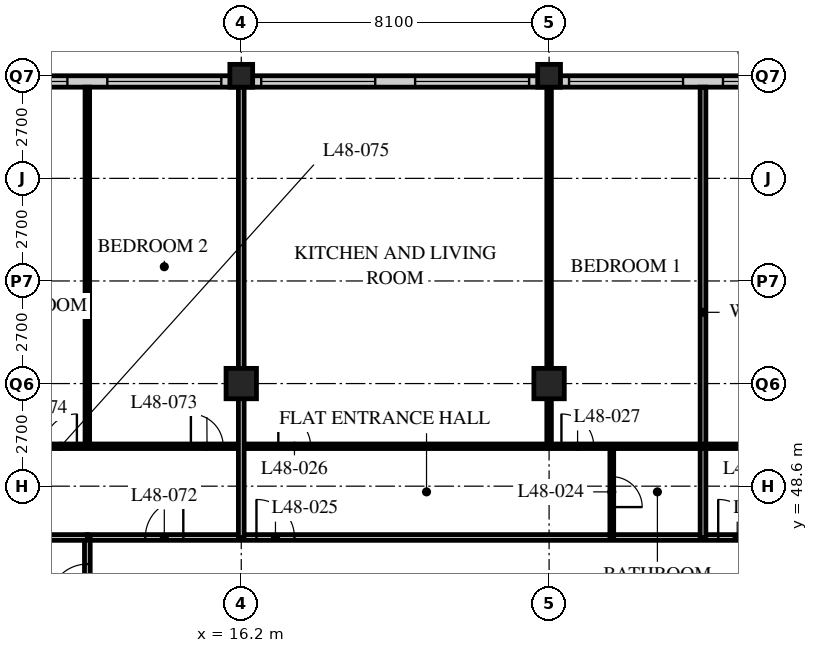
"""IFC4 building model, lengths in metres.
Left out: names, types, materials, properties, quantities, classifications, styles, units other than length and angle.
Written with IfcOpenShell. Run it as: python <this file> out.ifc"""

import sys

from ifc_helpers import new_model, si_unit, direction, frame, frame_2d, origin, origin_2d, place, context, subcontext, project, spatial, rectangle, hollow_rectangle, extrude, element, fill, save


model = new_model("IFC4")
c1 = context("Model", 3, precision=1e-05, world=origin(), true_north=direction((0.0, 1.0)))
c2 = subcontext(c1, "Body", "Model", "MODEL_VIEW")
j1 = project(units=[si_unit("LENGTHUNIT", "METRE"), si_unit("PLANEANGLEUNIT", "RADIAN")], contexts=[c1])
p1 = place(None, origin())
s1 = spatial("IfcSite", under=j1, at=p1, CompositionType="ELEMENT")
p2 = place(p1, origin())
s2 = spatial("IfcBuilding", under=s1, at=p2, CompositionType="ELEMENT")
p3 = place(p2, frame((0.0, 0.0, 188.4)))
s3 = spatial("IfcBuildingStorey", under=s2, at=p3, CompositionType="ELEMENT", Elevation=188.4)
p4 = place(p3, frame((16.2, 51.3, 0.0), z_axis=(0.0, 0.0, 1.0), x_axis=(1.0, 0.0, 0.0)))
e1 = element("IfcColumn", 1, at=p4, inside=s3, PredefinedType="COLUMN", context=c2, shape_type="SweptSolid", body=[
    extrude(hollow_rectangle(XDim=0.8, YDim=0.8, WallThickness=0.08, at=origin_2d()), origin(), (0.0, 0.0, 1.0), 3.6),
])
p5 = place(p3, frame((16.2, 59.4, 0.0), z_axis=(0.0, 0.0, 1.0), x_axis=(1.0, 0.0, 0.0)))
e2 = element("IfcColumn", 2, at=p5, inside=s3, PredefinedType="COLUMN", context=c2, shape_type="SweptSolid", body=[
    extrude(hollow_rectangle(XDim=0.6, YDim=0.6, WallThickness=0.05, at=origin_2d()), origin(), (0.0, 0.0, 1.0), 3.6),
])
p6 = place(p3, frame((24.3, 51.3, 0.0), z_axis=(0.0, 0.0, 1.0), x_axis=(1.0, 0.0, 0.0)))
e3 = element("IfcColumn", 3, at=p6, inside=s3, PredefinedType="COLUMN", context=c2, shape_type="SweptSolid", body=[
    extrude(hollow_rectangle(XDim=0.8, YDim=0.8, WallThickness=0.08, at=origin_2d()), origin(), (0.0, 0.0, 1.0), 3.6),
])
p7 = place(p3, frame((24.3, 59.4, 0.0), z_axis=(0.0, 0.0, 1.0), x_axis=(1.0, 0.0, 0.0)))
e4 = element("IfcColumn", 4, at=p7, inside=s3, PredefinedType="COLUMN", context=c2, shape_type="SweptSolid", body=[
    extrude(hollow_rectangle(XDim=0.6, YDim=0.6, WallThickness=0.05, at=origin_2d()), origin(), (0.0, 0.0, 1.0), 3.6),
])
p8 = place(p3, frame((48.3, 59.25, 0.0), z_axis=(0.0, 0.0, 1.0), x_axis=(-1.0, 0.0, 0.0)))
e5 = element("IfcWall", 5, at=p8, inside=s3, PredefinedType="SOLIDWALL", context=c2, shape_type="SweptSolid", body=[
    extrude(rectangle(XDim=40.2, YDim=0.3, at=frame_2d((20.1, 0.0))), origin(), (0.0, 0.0, 1.0), 3.39),
])
p9 = place(p8, frame((0.225, 0.0, 0.6)))
e6 = element("IfcOpeningElement", 6, at=p9, cuts=e5, PredefinedType="OPENING", context=c2, shape_type="SweptSolid", body=[
    extrude(rectangle(XDim=3.0, YDim=2.4, at=frame_2d((1.5, 1.2))), frame((0.0, 0.16, 0.0), z_axis=(0.0, -1.0, 0.0), x_axis=(1.0, 0.0, 0.0)), (0.0, 0.0, 1.0), 0.32),
])
p10 = place(p8, frame((4.275, 0.0, 0.6)))
e7 = element("IfcOpeningElement", 7, at=p10, cuts=e5, PredefinedType="OPENING", context=c2, shape_type="SweptSolid", body=[
    extrude(rectangle(XDim=3.0, YDim=2.4, at=frame_2d((1.5, 1.2))), frame((0.0, 0.16, 0.0), z_axis=(0.0, -1.0, 0.0), x_axis=(1.0, 0.0, 0.0)), (0.0, 0.0, 1.0), 0.32),
])
p11 = place(p8, frame((8.325, 0.0, 0.6)))
e8 = element("IfcOpeningElement", 8, at=p11, cuts=e5, PredefinedType="OPENING", context=c2, shape_type="SweptSolid", body=[
    extrude(rectangle(XDim=3.0, YDim=2.4, at=frame_2d((1.5, 1.2))), frame((0.0, 0.16, 0.0), z_axis=(0.0, -1.0, 0.0), x_axis=(1.0, 0.0, 0.0)), (0.0, 0.0, 1.0), 0.32),
])
p12 = place(p8, frame((12.375, 0.0, 0.6)))
e9 = element("IfcOpeningElement", 9, at=p12, cuts=e5, PredefinedType="OPENING", context=c2, shape_type="SweptSolid", body=[
    extrude(rectangle(XDim=3.0, YDim=2.4, at=frame_2d((1.5, 1.2))), frame((0.0, 0.16, 0.0), z_axis=(0.0, -1.0, 0.0), x_axis=(1.0, 0.0, 0.0)), (0.0, 0.0, 1.0), 0.32),
])
p13 = place(p8, frame((16.425, 0.0, 0.6)))
e10 = element("IfcOpeningElement", 10, at=p13, cuts=e5, PredefinedType="OPENING", context=c2, shape_type="SweptSolid", body=[
    extrude(rectangle(XDim=3.0, YDim=2.4, at=frame_2d((1.5, 1.2))), frame((0.0, 0.16, 0.0), z_axis=(0.0, -1.0, 0.0), x_axis=(1.0, 0.0, 0.0)), (0.0, 0.0, 1.0), 0.32),
])
p14 = place(p8, frame((20.475, 0.0, 0.6)))
e11 = element("IfcOpeningElement", 11, at=p14, cuts=e5, PredefinedType="OPENING", context=c2, shape_type="SweptSolid", body=[
    extrude(rectangle(XDim=3.0, YDim=2.4, at=frame_2d((1.5, 1.2))), frame((0.0, 0.16, 0.0), z_axis=(0.0, -1.0, 0.0), x_axis=(1.0, 0.0, 0.0)), (0.0, 0.0, 1.0), 0.32),
])
p15 = place(p8, frame((24.525, 0.0, 0.6)))
e12 = element("IfcOpeningElement", 12, at=p15, cuts=e5, PredefinedType="OPENING", context=c2, shape_type="SweptSolid", body=[
    extrude(rectangle(XDim=3.0, YDim=2.4, at=frame_2d((1.5, 1.2))), frame((0.0, 0.16, 0.0), z_axis=(0.0, -1.0, 0.0), x_axis=(1.0, 0.0, 0.0)), (0.0, 0.0, 1.0), 0.32),
])
p16 = place(p8, frame((28.575, 0.0, 0.6)))
e13 = element("IfcOpeningElement", 13, at=p16, cuts=e5, PredefinedType="OPENING", context=c2, shape_type="SweptSolid", body=[
    extrude(rectangle(XDim=3.0, YDim=2.4, at=frame_2d((1.5, 1.2))), frame((0.0, 0.16, 0.0), z_axis=(0.0, -1.0, 0.0), x_axis=(1.0, 0.0, 0.0)), (0.0, 0.0, 1.0), 0.32),
])
p17 = place(p8, frame((32.625, 0.0, 0.6)))
e14 = element("IfcOpeningElement", 14, at=p17, cuts=e5, PredefinedType="OPENING", context=c2, shape_type="SweptSolid", body=[
    extrude(rectangle(XDim=3.0, YDim=2.4, at=frame_2d((1.5, 1.2))), frame((0.0, 0.16, 0.0), z_axis=(0.0, -1.0, 0.0), x_axis=(1.0, 0.0, 0.0)), (0.0, 0.0, 1.0), 0.32),
])
p18 = place(p8, frame((36.675, 0.0, 0.6)))
e15 = element("IfcOpeningElement", 15, at=p18, cuts=e5, PredefinedType="OPENING", context=c2, shape_type="SweptSolid", body=[
    extrude(rectangle(XDim=3.0, YDim=2.4, at=frame_2d((1.5, 1.2))), frame((0.0, 0.16, 0.0), z_axis=(0.0, -1.0, 0.0), x_axis=(1.0, 0.0, 0.0)), (0.0, 0.0, 1.0), 0.32),
])
p19 = place(p3, frame((12.15, 47.25, 0.0), z_axis=(0.0, 0.0, 1.0), x_axis=(1.0, 0.0, 0.0)))
e16 = element("IfcWall", 16, at=p19, inside=s3, PredefinedType="PARTITIONING", context=c2, shape_type="SweptSolid", body=[
    extrude(rectangle(XDim=32.4, YDim=0.15, at=frame_2d((16.2, 0.0))), origin(), (0.0, 0.0, 1.0), 3.39),
])
p20 = place(p19, frame((4.45, 0.0, 0.0)))
e17 = element("IfcOpeningElement", 17, at=p20, cuts=e16, PredefinedType="OPENING", context=c2, shape_type="SweptSolid", body=[
    extrude(rectangle(XDim=1.0, YDim=2.1, at=frame_2d((0.5, 1.05))), frame((0.0, 0.085, 0.0), z_axis=(0.0, -1.0, 0.0), x_axis=(1.0, 0.0, 0.0)), (0.0, 0.0, 1.0), 0.17),
])
p21 = place(p19, frame((16.6, 0.0, 0.0)))
e18 = element("IfcOpeningElement", 18, at=p21, cuts=e16, PredefinedType="OPENING", context=c2, shape_type="SweptSolid", body=[
    extrude(rectangle(XDim=1.0, YDim=2.1, at=frame_2d((0.5, 1.05))), frame((0.0, 0.085, 0.0), z_axis=(0.0, -1.0, 0.0), x_axis=(1.0, 0.0, 0.0)), (0.0, 0.0, 1.0), 0.17),
])
p22 = place(p19, frame((29.875, 0.0, 0.0)))
e19 = element("IfcOpeningElement", 19, at=p22, cuts=e16, PredefinedType="OPENING", context=c2, shape_type="SweptSolid", body=[
    extrude(rectangle(XDim=1.0, YDim=2.1, at=frame_2d((0.5, 1.05))), frame((0.0, 0.085, 0.0), z_axis=(0.0, -1.0, 0.0), x_axis=(1.0, 0.0, 0.0)), (0.0, 0.0, 1.0), 0.17),
])
p23 = place(p19, frame((1.525, 0.0, 0.0)))
e20 = element("IfcOpeningElement", 20, at=p23, cuts=e16, PredefinedType="OPENING", context=c2, shape_type="SweptSolid", body=[
    extrude(rectangle(XDim=1.0, YDim=2.1, at=frame_2d((0.5, 1.05))), frame((0.0, 0.085, 0.0), z_axis=(0.0, -1.0, 0.0), x_axis=(1.0, 0.0, 0.0)), (0.0, 0.0, 1.0), 0.17),
])
p24 = place(p3, frame((12.15, 18.9, 0.0), z_axis=(0.0, 0.0, 1.0), x_axis=(0.0, 1.0, 0.0)))
e21 = element("IfcWall", 21, at=p24, inside=s3, PredefinedType="PARTITIONING", context=c2, shape_type="SweptSolid", body=[
    extrude(rectangle(XDim=28.35, YDim=0.15, at=frame_2d((14.175, 0.0))), origin(), (0.0, 0.0, 1.0), 3.39),
])
p25 = place(p24, frame((2.35, 0.0, 0.0)))
e22 = element("IfcOpeningElement", 22, at=p25, cuts=e21, PredefinedType="OPENING", context=c2, shape_type="SweptSolid", body=[
    extrude(rectangle(XDim=1.0, YDim=2.1, at=frame_2d((0.5, 1.05))), frame((0.0, 0.085, 0.0), z_axis=(0.0, -1.0, 0.0), x_axis=(1.0, 0.0, 0.0)), (0.0, 0.0, 1.0), 0.17),
])
p26 = place(p24, frame((6.4, 0.0, 0.0)))
e23 = element("IfcOpeningElement", 23, at=p26, cuts=e21, PredefinedType="OPENING", context=c2, shape_type="SweptSolid", body=[
    extrude(rectangle(XDim=1.0, YDim=2.1, at=frame_2d((0.5, 1.05))), frame((0.0, 0.085, 0.0), z_axis=(0.0, -1.0, 0.0), x_axis=(1.0, 0.0, 0.0)), (0.0, 0.0, 1.0), 0.17),
])
p27 = place(p24, frame((8.5, 0.0, 0.0)))
e24 = element("IfcOpeningElement", 24, at=p27, cuts=e21, PredefinedType="OPENING", context=c2, shape_type="SweptSolid", body=[
    extrude(rectangle(XDim=1.0, YDim=2.1, at=frame_2d((0.5, 1.05))), frame((0.0, 0.085, 0.0), z_axis=(0.0, -1.0, 0.0), x_axis=(1.0, 0.0, 0.0)), (0.0, 0.0, 1.0), 0.17),
])
p28 = place(p24, frame((16.6, 0.0, 0.0)))
e25 = element("IfcOpeningElement", 25, at=p28, cuts=e21, PredefinedType="OPENING", context=c2, shape_type="SweptSolid", body=[
    extrude(rectangle(XDim=1.0, YDim=2.1, at=frame_2d((0.5, 1.05))), frame((0.0, 0.085, 0.0), z_axis=(0.0, -1.0, 0.0), x_axis=(1.0, 0.0, 0.0)), (0.0, 0.0, 1.0), 0.17),
])
p29 = place(p24, frame((26.65, 0.0, 0.0)))
e26 = element("IfcOpeningElement", 26, at=p29, cuts=e21, PredefinedType="OPENING", context=c2, shape_type="SweptSolid", body=[
    extrude(rectangle(XDim=1.0, YDim=2.1, at=frame_2d((0.5, 1.05))), frame((0.0, 0.085, 0.0), z_axis=(0.0, -1.0, 0.0), x_axis=(1.0, 0.0, 0.0)), (0.0, 0.0, 1.0), 0.17),
])
p30 = place(p3, frame((25.95, 47.25, 0.0), z_axis=(0.0, 0.0, 1.0), x_axis=(0.0, 1.0, 0.0)))
e27 = element("IfcWall", 27, at=p30, inside=s3, PredefinedType="PARTITIONING", context=c2, shape_type="SweptSolid", body=[
    extrude(rectangle(XDim=2.4, YDim=0.1, at=frame_2d((1.2, 0.0))), origin(), (0.0, 0.0, 1.0), 3.39),
])
p31 = place(p30, frame((0.8, 0.0, 0.0)))
e28 = element("IfcOpeningElement", 28, at=p31, cuts=e27, PredefinedType="OPENING", context=c2, shape_type="SweptSolid", body=[
    extrude(rectangle(XDim=0.8, YDim=2.1, at=frame_2d((0.4, 1.05))), frame((0.0, 0.06, 0.0), z_axis=(0.0, -1.0, 0.0), x_axis=(1.0, 0.0, 0.0)), (0.0, 0.0, 1.0), 0.12),
])
p32 = place(p3, frame((24.3, 49.65, 0.0), z_axis=(0.0, 0.0, 1.0), x_axis=(0.0, 1.0, 0.0)))
e29 = element("IfcWall", 29, at=p32, inside=s3, PredefinedType="PARTITIONING", context=c2, shape_type="SweptSolid", body=[
    extrude(rectangle(XDim=9.45, YDim=0.12, at=frame_2d((4.725, 0.0))), origin(), (0.0, 0.0, 1.0), 2.778),
])
p33 = place(p3, frame((28.35, 47.25, 0.0), z_axis=(0.0, 0.0, 1.0), x_axis=(0.0, 1.0, 0.0)))
e30 = element("IfcWall", 30, at=p33, inside=s3, PredefinedType="PARTITIONING", context=c2, shape_type="SweptSolid", body=[
    extrude(rectangle(XDim=11.85, YDim=0.15, at=frame_2d((5.925, 0.0))), origin(), (0.0, 0.0, 1.0), 3.39),
])
p34 = place(p3, frame((8.15, 49.65, 0.0), z_axis=(0.0, 0.0, 1.0), x_axis=(1.0, 0.0, 0.0)))
e31 = element("IfcWall", 31, at=p34, inside=s3, PredefinedType="PARTITIONING", context=c2, shape_type="SweptSolid", body=[
    extrude(rectangle(XDim=40.4, YDim=0.12, at=frame_2d((20.2, 0.0))), origin(), (0.0, 0.0, 1.0), 3.39),
])
p35 = place(p34, frame((9.025, 0.0, 0.0)))
e32 = element("IfcOpeningElement", 32, at=p35, cuts=e31, PredefinedType="OPENING", context=c2, shape_type="SweptSolid", body=[
    extrude(rectangle(XDim=0.85, YDim=2.1, at=frame_2d((0.425, 1.05))), frame((0.0, 0.07, 0.0), z_axis=(0.0, -1.0, 0.0), x_axis=(1.0, 0.0, 0.0)), (0.0, 0.0, 1.0), 0.14),
])
p36 = place(p34, frame((16.475, 0.0, 0.0)))
e33 = element("IfcOpeningElement", 33, at=p36, cuts=e31, PredefinedType="OPENING", context=c2, shape_type="SweptSolid", body=[
    extrude(rectangle(XDim=0.85, YDim=2.1, at=frame_2d((0.425, 1.05))), frame((0.0, 0.07, 0.0), z_axis=(0.0, -1.0, 0.0), x_axis=(1.0, 0.0, 0.0)), (0.0, 0.0, 1.0), 0.14),
])
p37 = place(p34, frame((21.175, 0.0, 0.0)))
e34 = element("IfcOpeningElement", 34, at=p37, cuts=e31, PredefinedType="OPENING", context=c2, shape_type="SweptSolid", body=[
    extrude(rectangle(XDim=0.85, YDim=2.1, at=frame_2d((0.425, 1.05))), frame((0.0, 0.07, 0.0), z_axis=(0.0, -1.0, 0.0), x_axis=(1.0, 0.0, 0.0)), (0.0, 0.0, 1.0), 0.14),
])
p38 = place(p34, frame((28.625, 0.0, 0.0)))
e35 = element("IfcOpeningElement", 35, at=p38, cuts=e31, PredefinedType="OPENING", context=c2, shape_type="SweptSolid", body=[
    extrude(rectangle(XDim=0.85, YDim=2.1, at=frame_2d((0.425, 1.05))), frame((0.0, 0.07, 0.0), z_axis=(0.0, -1.0, 0.0), x_axis=(1.0, 0.0, 0.0)), (0.0, 0.0, 1.0), 0.14),
])
p39 = place(p34, frame((32.825, 0.0, 0.0)))
e36 = element("IfcOpeningElement", 36, at=p39, cuts=e31, PredefinedType="OPENING", context=c2, shape_type="SweptSolid", body=[
    extrude(rectangle(XDim=0.85, YDim=2.1, at=frame_2d((0.425, 1.05))), frame((0.0, 0.07, 0.0), z_axis=(0.0, -1.0, 0.0), x_axis=(1.0, 0.0, 0.0)), (0.0, 0.0, 1.0), 0.14),
])
p40 = place(p34, frame((36.675, 0.0, 0.0)))
e37 = element("IfcOpeningElement", 37, at=p40, cuts=e31, PredefinedType="OPENING", context=c2, shape_type="SweptSolid", body=[
    extrude(rectangle(XDim=0.85, YDim=2.1, at=frame_2d((0.425, 1.05))), frame((0.0, 0.07, 0.0), z_axis=(0.0, -1.0, 0.0), x_axis=(1.0, 0.0, 0.0)), (0.0, 0.0, 1.0), 0.14),
])
p41 = place(p34, frame((6.725, 0.0, 0.0)))
e38 = element("IfcOpeningElement", 38, at=p41, cuts=e31, PredefinedType="OPENING", context=c2, shape_type="SweptSolid", body=[
    extrude(rectangle(XDim=0.85, YDim=2.1, at=frame_2d((0.425, 1.05))), frame((0.0, 0.07, 0.0), z_axis=(0.0, -1.0, 0.0), x_axis=(1.0, 0.0, 0.0)), (0.0, 0.0, 1.0), 0.14),
])
p42 = place(p34, frame((2.875, 0.0, 0.0)))
e39 = element("IfcOpeningElement", 39, at=p42, cuts=e31, PredefinedType="OPENING", context=c2, shape_type="SweptSolid", body=[
    extrude(rectangle(XDim=0.85, YDim=2.1, at=frame_2d((0.425, 1.05))), frame((0.0, 0.07, 0.0), z_axis=(0.0, -1.0, 0.0), x_axis=(1.0, 0.0, 0.0)), (0.0, 0.0, 1.0), 0.14),
])
p43 = place(p3, frame((12.15, 49.65, 0.0), z_axis=(0.0, 0.0, 1.0), x_axis=(0.0, 1.0, 0.0)))
e40 = element("IfcWall", 40, at=p43, inside=s3, PredefinedType="PARTITIONING", context=c2, shape_type="SweptSolid", body=[
    extrude(rectangle(XDim=9.45, YDim=0.12, at=frame_2d((4.725, 0.0))), origin(), (0.0, 0.0, 1.0), 3.39),
])
p44 = place(p3, frame((0.3, 47.25, 0.0), z_axis=(0.0, 0.0, 1.0), x_axis=(1.0, 0.0, 0.0)))
e41 = element("IfcWall", 41, at=p44, inside=s3, PredefinedType="PARTITIONING", context=c2, shape_type="SweptSolid", body=[
    extrude(rectangle(XDim=11.85, YDim=0.15, at=frame_2d((5.925, 0.0))), origin(), (0.0, 0.0, 1.0), 3.39),
])
p45 = place(p3, frame((16.2, 47.25, 0.0), z_axis=(0.0, 0.0, 1.0), x_axis=(0.0, 1.0, 0.0)))
e42 = element("IfcWall", 42, at=p45, inside=s3, PredefinedType="PARTITIONING", context=c2, shape_type="SweptSolid", body=[
    extrude(rectangle(XDim=11.85, YDim=0.15, at=frame_2d((5.925, 0.0))), origin(), (0.0, 0.0, 1.0), 2.778),
])
p46 = place(p13, origin())
e43 = element("IfcWindow", 43, at=p46, inside=s3, PartitioningType="SINGLE_PANEL", PredefinedType="WINDOW", context=c2, shape_type="SweptSolid", body=[
    extrude(rectangle(XDim=3.0, YDim=2.4, at=frame_2d((1.5, 1.2))), frame((0.0, 0.03, 0.0), z_axis=(0.0, -1.0, 0.0), x_axis=(1.0, 0.0, 0.0)), (0.0, 0.0, 1.0), 0.06),
])
fill(e10, e43)
p47 = place(p14, origin())
e44 = element("IfcWindow", 44, at=p47, inside=s3, PartitioningType="SINGLE_PANEL", PredefinedType="WINDOW", context=c2, shape_type="SweptSolid", body=[
    extrude(rectangle(XDim=3.0, YDim=2.4, at=frame_2d((1.5, 1.2))), frame((0.0, 0.03, 0.0), z_axis=(0.0, -1.0, 0.0), x_axis=(1.0, 0.0, 0.0)), (0.0, 0.0, 1.0), 0.06),
])
fill(e11, e44)
p48 = place(p15, origin())
e45 = element("IfcWindow", 45, at=p48, inside=s3, PartitioningType="SINGLE_PANEL", PredefinedType="WINDOW", context=c2, shape_type="SweptSolid", body=[
    extrude(rectangle(XDim=3.0, YDim=2.4, at=frame_2d((1.5, 1.2))), frame((0.0, 0.03, 0.0), z_axis=(0.0, -1.0, 0.0), x_axis=(1.0, 0.0, 0.0)), (0.0, 0.0, 1.0), 0.06),
])
fill(e12, e45)
p49 = place(p16, origin())
e46 = element("IfcWindow", 46, at=p49, inside=s3, PartitioningType="SINGLE_PANEL", PredefinedType="WINDOW", context=c2, shape_type="SweptSolid", body=[
    extrude(rectangle(XDim=3.0, YDim=2.4, at=frame_2d((1.5, 1.2))), frame((0.0, 0.03, 0.0), z_axis=(0.0, -1.0, 0.0), x_axis=(1.0, 0.0, 0.0)), (0.0, 0.0, 1.0), 0.06),
])
fill(e13, e46)
p50 = place(p17, origin())
e47 = element("IfcWindow", 47, at=p50, inside=s3, PartitioningType="SINGLE_PANEL", PredefinedType="WINDOW", context=c2, shape_type="SweptSolid", body=[
    extrude(rectangle(XDim=3.0, YDim=2.4, at=frame_2d((1.5, 1.2))), frame((0.0, 0.03, 0.0), z_axis=(0.0, -1.0, 0.0), x_axis=(1.0, 0.0, 0.0)), (0.0, 0.0, 1.0), 0.06),
])
fill(e14, e47)
p51 = place(p18, origin())
e48 = element("IfcWindow", 48, at=p51, inside=s3, PartitioningType="SINGLE_PANEL", PredefinedType="WINDOW", context=c2, shape_type="SweptSolid", body=[
    extrude(rectangle(XDim=3.0, YDim=2.4, at=frame_2d((1.5, 1.2))), frame((0.0, 0.03, 0.0), z_axis=(0.0, -1.0, 0.0), x_axis=(1.0, 0.0, 0.0)), (0.0, 0.0, 1.0), 0.06),
])
fill(e15, e48)
p52 = place(p31, origin())
e49 = element("IfcDoor", 49, at=p52, inside=s3, OperationType="SINGLE_SWING_RIGHT", PredefinedType="DOOR", context=c2, shape_type="SweptSolid", body=[
    extrude(rectangle(XDim=0.8, YDim=2.1, at=frame_2d((0.4, 1.05))), frame((0.0, 0.025, 0.0), z_axis=(0.0, -1.0, 0.0), x_axis=(1.0, 0.0, 0.0)), (0.0, 0.0, 1.0), 0.05),
])
fill(e28, e49)
p53 = place(p20, origin())
e50 = element("IfcDoor", 50, at=p53, inside=s3, OperationType="SINGLE_SWING_LEFT", PredefinedType="DOOR", context=c2, shape_type="SweptSolid", body=[
    extrude(rectangle(XDim=1.0, YDim=2.1, at=frame_2d((0.5, 1.05))), frame((0.0, 0.025, 0.0), z_axis=(0.0, -1.0, 0.0), x_axis=(1.0, 0.0, 0.0)), (0.0, 0.0, 1.0), 0.05),
])
fill(e17, e50)
p54 = place(p35, origin())
e51 = element("IfcDoor", 51, at=p54, inside=s3, OperationType="SINGLE_SWING_LEFT", PredefinedType="DOOR", context=c2, shape_type="SweptSolid", body=[
    extrude(rectangle(XDim=0.85, YDim=2.1, at=frame_2d((0.425, 1.05))), frame((0.0, 0.025, 0.0), z_axis=(0.0, -1.0, 0.0), x_axis=(1.0, 0.0, 0.0)), (0.0, 0.0, 1.0), 0.05),
])
fill(e32, e51)
p55 = place(p36, origin())
e52 = element("IfcDoor", 52, at=p55, inside=s3, OperationType="SINGLE_SWING_LEFT", PredefinedType="DOOR", context=c2, shape_type="SweptSolid", body=[
    extrude(rectangle(XDim=0.85, YDim=2.1, at=frame_2d((0.425, 1.05))), frame((0.0, 0.025, 0.0), z_axis=(0.0, -1.0, 0.0), x_axis=(1.0, 0.0, 0.0)), (0.0, 0.0, 1.0), 0.05),
])
fill(e33, e52)
p56 = place(p21, origin())
e53 = element("IfcDoor", 53, at=p56, inside=s3, OperationType="SINGLE_SWING_LEFT", PredefinedType="DOOR", context=c2, shape_type="SweptSolid", body=[
    extrude(rectangle(XDim=1.0, YDim=2.1, at=frame_2d((0.5, 1.05))), frame((0.0, 0.025, 0.0), z_axis=(0.0, -1.0, 0.0), x_axis=(1.0, 0.0, 0.0)), (0.0, 0.0, 1.0), 0.05),
])
fill(e18, e53)
p57 = place(p29, origin())
e54 = element("IfcDoor", 54, at=p57, inside=s3, OperationType="SINGLE_SWING_LEFT", PredefinedType="DOOR", context=c2, shape_type="SweptSolid", body=[
    extrude(rectangle(XDim=1.0, YDim=2.1, at=frame_2d((0.5, 1.05))), frame((0.0, 0.025, 0.0), z_axis=(0.0, -1.0, 0.0), x_axis=(1.0, 0.0, 0.0)), (0.0, 0.0, 1.0), 0.05),
])
fill(e26, e54)
p58 = place(p23, origin())
e55 = element("IfcDoor", 55, at=p58, inside=s3, OperationType="SINGLE_SWING_RIGHT", PredefinedType="DOOR", context=c2, shape_type="SweptSolid", body=[
    extrude(rectangle(XDim=1.0, YDim=2.1, at=frame_2d((0.5, 1.05))), frame((0.0, 0.025, 0.0), z_axis=(0.0, -1.0, 0.0), x_axis=(1.0, 0.0, 0.0)), (0.0, 0.0, 1.0), 0.05),
])
fill(e20, e55)
p59 = place(p41, origin())
e56 = element("IfcDoor", 56, at=p59, inside=s3, OperationType="SINGLE_SWING_LEFT", PredefinedType="DOOR", context=c2, shape_type="SweptSolid", body=[
    extrude(rectangle(XDim=0.85, YDim=2.1, at=frame_2d((0.425, 1.05))), frame((0.0, 0.025, 0.0), z_axis=(0.0, -1.0, 0.0), x_axis=(1.0, 0.0, 0.0)), (0.0, 0.0, 1.0), 0.05),
])
fill(e38, e56)
p60 = place(p42, origin())
e57 = element("IfcDoor", 57, at=p60, inside=s3, OperationType="SINGLE_SWING_RIGHT", PredefinedType="DOOR", context=c2, shape_type="SweptSolid", body=[
    extrude(rectangle(XDim=0.85, YDim=2.1, at=frame_2d((0.425, 1.05))), frame((0.0, 0.025, 0.0), z_axis=(0.0, -1.0, 0.0), x_axis=(1.0, 0.0, 0.0)), (0.0, 0.0, 1.0), 0.05),
])
fill(e39, e57)
save(model, sys.argv[1])
